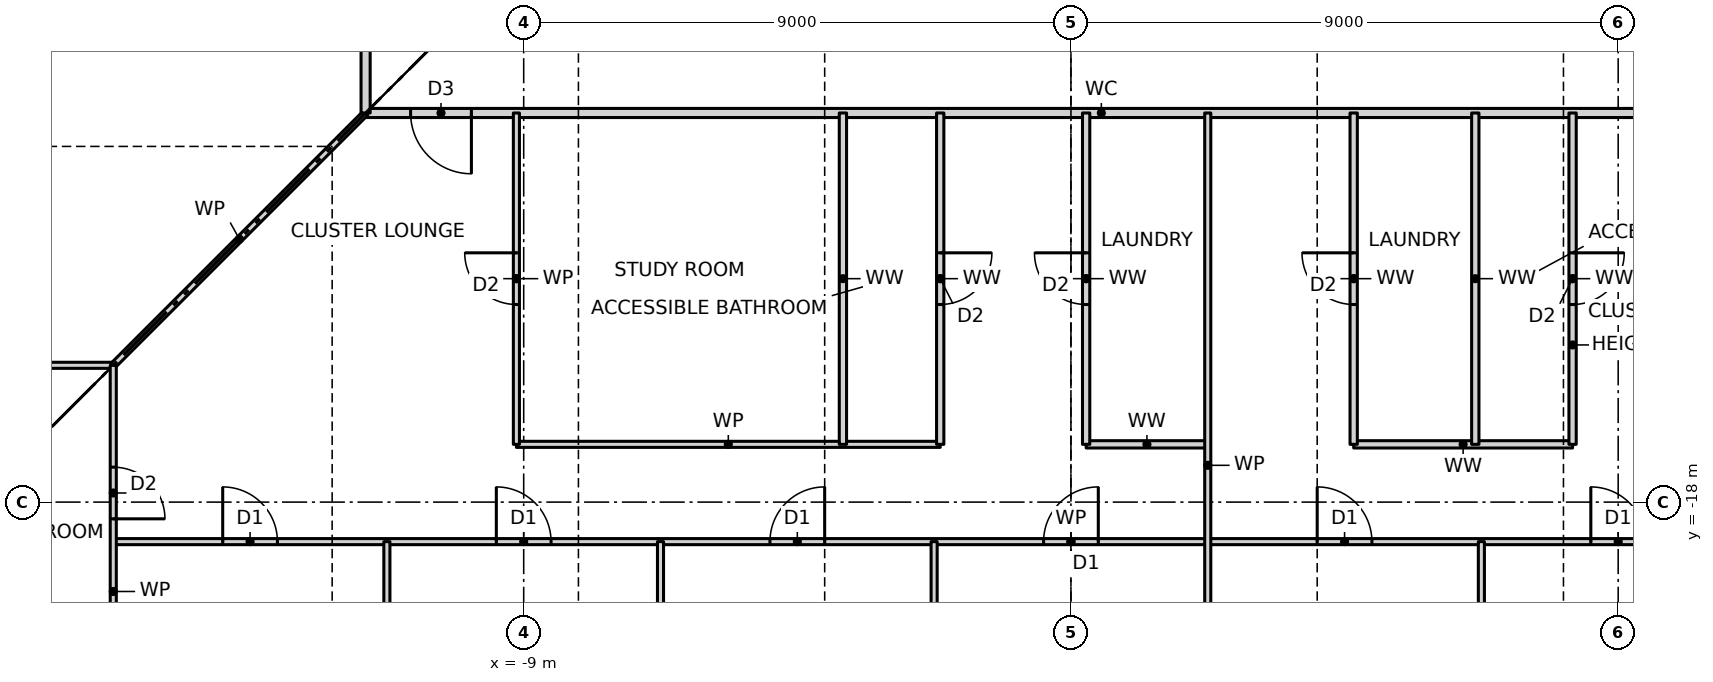
"""IFC4 building model, lengths in metres.
Left out: names, types, materials, properties, quantities, classifications, styles, units other than length and angle.
Written with IfcOpenShell. Run it as: python <this file> out.ifc"""

import sys

from ifc_helpers import new_model, si_unit, direction, frame, frame_2d, origin, place, context, subcontext, project, spatial, rectangle, extrude, element, fill, save


model = new_model("IFC4")
c1 = context("Model", 3, precision=1e-05, world=origin(), true_north=direction((0.0, 1.0)))
c2 = subcontext(c1, "Body", "Model", "MODEL_VIEW")
j1 = project(units=[si_unit("LENGTHUNIT", "METRE"), si_unit("PLANEANGLEUNIT", "RADIAN")], contexts=[c1])
p1 = place(None, origin())
s1 = spatial("IfcSite", under=j1, at=p1, CompositionType="ELEMENT")
p2 = place(p1, origin())
s2 = spatial("IfcBuilding", under=s1, at=p2, CompositionType="ELEMENT")
p3 = place(p2, frame((0.0, 0.0, 71.0)))
s3 = spatial("IfcBuildingStorey", under=s2, at=p3, CompositionType="ELEMENT", Elevation=71.0)
p4 = place(p3, frame((-15.75, -18.65, 0.0), z_axis=(0.0, 0.0, 1.0), x_axis=(1.0, 0.0, 0.0)))
e1 = element("IfcWall", 1, at=p4, inside=s3, PredefinedType="PARTITIONING", context=c2, shape_type="SweptSolid", body=[
    extrude(rectangle(XDim=31.5, YDim=0.1, at=frame_2d((15.75, 0.0))), origin(), (0.0, 0.0, 1.0), 3.2),
])
p5 = place(p4, frame((1.8, 0.0, 0.0)))
e2 = element("IfcOpeningElement", 2, at=p5, cuts=e1, PredefinedType="OPENING", context=c2, shape_type="SweptSolid", body=[
    extrude(rectangle(XDim=0.9, YDim=2.1, at=frame_2d((0.45, 1.05))), frame((0.0, 0.06, 0.0), z_axis=(0.0, -1.0, 0.0), x_axis=(1.0, 0.0, 0.0)), (0.0, 0.0, 1.0), 0.12),
])
p6 = place(p4, frame((6.3, 0.0, 0.0)))
e3 = element("IfcOpeningElement", 3, at=p6, cuts=e1, PredefinedType="OPENING", context=c2, shape_type="SweptSolid", body=[
    extrude(rectangle(XDim=0.9, YDim=2.1, at=frame_2d((0.45, 1.05))), frame((0.0, 0.06, 0.0), z_axis=(0.0, -1.0, 0.0), x_axis=(1.0, 0.0, 0.0)), (0.0, 0.0, 1.0), 0.12),
])
p7 = place(p4, frame((10.8, 0.0, 0.0)))
e4 = element("IfcOpeningElement", 4, at=p7, cuts=e1, PredefinedType="OPENING", context=c2, shape_type="SweptSolid", body=[
    extrude(rectangle(XDim=0.9, YDim=2.1, at=frame_2d((0.45, 1.05))), frame((0.0, 0.06, 0.0), z_axis=(0.0, -1.0, 0.0), x_axis=(1.0, 0.0, 0.0)), (0.0, 0.0, 1.0), 0.12),
])
p8 = place(p4, frame((15.3, 0.0, 0.0)))
e5 = element("IfcOpeningElement", 5, at=p8, cuts=e1, PredefinedType="OPENING", context=c2, shape_type="SweptSolid", body=[
    extrude(rectangle(XDim=0.9, YDim=2.1, at=frame_2d((0.45, 1.05))), frame((0.0, 0.06, 0.0), z_axis=(0.0, -1.0, 0.0), x_axis=(1.0, 0.0, 0.0)), (0.0, 0.0, 1.0), 0.12),
])
p9 = place(p4, frame((19.8, 0.0, 0.0)))
e6 = element("IfcOpeningElement", 6, at=p9, cuts=e1, PredefinedType="OPENING", context=c2, shape_type="SweptSolid", body=[
    extrude(rectangle(XDim=0.9, YDim=2.1, at=frame_2d((0.45, 1.05))), frame((0.0, 0.06, 0.0), z_axis=(0.0, -1.0, 0.0), x_axis=(1.0, 0.0, 0.0)), (0.0, 0.0, 1.0), 0.12),
])
p10 = place(p4, frame((24.3, 0.0, 0.0)))
e7 = element("IfcOpeningElement", 7, at=p10, cuts=e1, PredefinedType="OPENING", context=c2, shape_type="SweptSolid", body=[
    extrude(rectangle(XDim=0.9, YDim=2.1, at=frame_2d((0.45, 1.05))), frame((0.0, 0.06, 0.0), z_axis=(0.0, -1.0, 0.0), x_axis=(1.0, 0.0, 0.0)), (0.0, 0.0, 1.0), 0.12),
])
p11 = place(p4, frame((28.8, 0.0, 0.0)))
e8 = element("IfcOpeningElement", 8, at=p11, cuts=e1, PredefinedType="OPENING", context=c2, shape_type="SweptSolid", body=[
    extrude(rectangle(XDim=0.9, YDim=2.1, at=frame_2d((0.45, 1.05))), frame((0.0, 0.06, 0.0), z_axis=(0.0, -1.0, 0.0), x_axis=(1.0, 0.0, 0.0)), (0.0, 0.0, 1.0), 0.12),
])
p12 = place(p3, frame((-9.12, -17.05, 0.0), z_axis=(0.0, 0.0, 1.0), x_axis=(1.0, 0.0, 0.0)))
e9 = element("IfcWall", 9, at=p12, inside=s3, PredefinedType="PARTITIONING", context=c2, shape_type="SweptSolid", body=[
    extrude(rectangle(XDim=6.97, YDim=0.1, at=frame_2d((3.485, 0.0))), origin(), (0.0, 0.0, 1.0), 3.2),
])
p13 = place(p3, frame((0.25, -17.05, 0.0), z_axis=(0.0, 0.0, 1.0), x_axis=(1.0, 0.0, 0.0)))
e10 = element("IfcWall", 10, at=p13, inside=s3, PredefinedType="PARTITIONING", context=c2, shape_type="SweptSolid", body=[
    extrude(rectangle(XDim=2.0, YDim=0.12, at=frame_2d((1.0, 0.0))), origin(), (0.0, 0.0, 1.0), 3.2),
])
p14 = place(p3, frame((4.65, -17.05, 0.0), z_axis=(0.0, 0.0, 1.0), x_axis=(1.0, 0.0, 0.0)))
e11 = element("IfcWall", 11, at=p14, inside=s3, PredefinedType="PARTITIONING", context=c2, shape_type="SweptSolid", body=[
    extrude(rectangle(XDim=3.6, YDim=0.12, at=frame_2d((1.8, 0.0))), origin(), (0.0, 0.0, 1.0), 3.2),
])
p15 = place(p3, frame((-23.19, -15.75, 0.0), z_axis=(0.0, 0.0, 1.0), x_axis=(1.0, 0.0, 0.0)))
e12 = element("IfcWall", 12, at=p15, inside=s3, PredefinedType="PARTITIONING", context=c2, shape_type="SweptSolid", body=[
    extrude(rectangle(XDim=7.44, YDim=0.1, at=frame_2d((3.72, 0.0))), origin(), (0.0, 0.0, 1.0), 3.2),
])
p16 = place(p3, frame((-11.6, -11.6, 0.0), z_axis=(0.0, 0.0, 1.0), x_axis=(1.0, 0.0, 0.0)))
e13 = element("IfcWall", 13, at=p16, inside=s3, PredefinedType="PARTITIONING", context=c2, shape_type="SweptSolid", body=[
    extrude(rectangle(XDim=24.2, YDim=0.15, at=frame_2d((12.1, 0.0))), origin(), (0.0, 0.0, 1.0), 3.2),
])
p17 = place(p16, frame((0.74, 0.0, 0.0)))
e14 = element("IfcOpeningElement", 14, at=p17, cuts=e13, PredefinedType="OPENING", context=c2, shape_type="SweptSolid", body=[
    extrude(rectangle(XDim=1.0, YDim=2.1, at=frame_2d((0.5, 1.05))), frame((0.0, 0.085, 0.0), z_axis=(0.0, -1.0, 0.0), x_axis=(1.0, 0.0, 0.0)), (0.0, 0.0, 1.0), 0.17),
])
p18 = place(p16, frame((21.025, 0.0, 0.0)))
e15 = element("IfcOpeningElement", 15, at=p18, cuts=e13, PredefinedType="OPENING", context=c2, shape_type="SweptSolid", body=[
    extrude(rectangle(XDim=1.0, YDim=2.1, at=frame_2d((0.5, 1.05))), frame((0.0, 0.085, 0.0), z_axis=(0.0, -1.0, 0.0), x_axis=(1.0, 0.0, 0.0)), (0.0, 0.0, 1.0), 0.17),
])
p19 = place(p3, frame((-15.75, -15.75, 0.0), z_axis=(0.0, 0.0, 1.0), x_axis=(0.707106781187, 0.707106781187, 0.0)))
e16 = element("IfcWall", 16, at=p19, inside=s3, PredefinedType="PARTITIONING", context=c2, shape_type="SweptSolid", body=[
    extrude(rectangle(XDim=5.869, YDim=0.1, at=frame_2d((2.935, 0.0))), origin(), (0.0, 0.0, 1.0), 3.2),
])
p20 = place(p3, frame((8.25, -17.05, 0.0), z_axis=(0.0, 0.0, 1.0), x_axis=(0.0, 1.0, 0.0)))
e17 = element("IfcWall", 17, at=p20, inside=s3, PredefinedType="PARTITIONING", context=c2, shape_type="SweptSolid", body=[
    extrude(rectangle(XDim=5.45, YDim=0.12, at=frame_2d((2.725, 0.0))), origin(), (0.0, 0.0, 1.0), 2.273),
])
p21 = place(p20, frame((2.3, 0.0, 0.0)))
e18 = element("IfcOpeningElement", 18, at=p21, cuts=e17, PredefinedType="OPENING", context=c2, shape_type="SweptSolid", body=[
    extrude(rectangle(XDim=0.85, YDim=2.1, at=frame_2d((0.425, 1.05))), frame((0.0, 0.07, 0.0), z_axis=(0.0, -1.0, 0.0), x_axis=(1.0, 0.0, 0.0)), (0.0, 0.0, 1.0), 0.14),
])
p22 = place(p3, frame((6.75, -23.19, 0.0), z_axis=(0.0, 0.0, 1.0), x_axis=(0.0, 1.0, 0.0)))
e19 = element("IfcWall", 19, at=p22, inside=s3, PredefinedType="PARTITIONING", context=c2, shape_type="SweptSolid", body=[
    extrude(rectangle(XDim=4.54, YDim=0.1, at=frame_2d((2.27, 0.0))), origin(), (0.0, 0.0, 1.0), 3.2),
])
p23 = place(p3, frame((6.65, -17.05, 0.0), z_axis=(0.0, 0.0, 1.0), x_axis=(0.0, 1.0, 0.0)))
e20 = element("IfcWall", 20, at=p23, inside=s3, PredefinedType="PARTITIONING", context=c2, shape_type="SweptSolid", body=[
    extrude(rectangle(XDim=5.45, YDim=0.12, at=frame_2d((2.725, 0.0))), origin(), (0.0, 0.0, 1.0), 3.2),
])
p24 = place(p3, frame((4.65, -17.05, 0.0), z_axis=(0.0, 0.0, 1.0), x_axis=(0.0, 1.0, 0.0)))
e21 = element("IfcWall", 21, at=p24, inside=s3, PredefinedType="PARTITIONING", context=c2, shape_type="SweptSolid", body=[
    extrude(rectangle(XDim=5.45, YDim=0.12, at=frame_2d((2.725, 0.0))), origin(), (0.0, 0.0, 1.0), 3.2),
])
p25 = place(p24, frame((2.3, 0.0, 0.0)))
e22 = element("IfcOpeningElement", 22, at=p25, cuts=e21, PredefinedType="OPENING", context=c2, shape_type="SweptSolid", body=[
    extrude(rectangle(XDim=0.85, YDim=2.1, at=frame_2d((0.425, 1.05))), frame((0.0, 0.07, 0.0), z_axis=(0.0, -1.0, 0.0), x_axis=(1.0, 0.0, 0.0)), (0.0, 0.0, 1.0), 0.14),
])
p26 = place(p3, frame((2.25, -23.19, 0.0), z_axis=(0.0, 0.0, 1.0), x_axis=(0.0, 1.0, 0.0)))
e23 = element("IfcWall", 23, at=p26, inside=s3, PredefinedType="PARTITIONING", context=c2, shape_type="SweptSolid", body=[
    extrude(rectangle(XDim=11.59, YDim=0.1, at=frame_2d((5.795, 0.0))), origin(), (0.0, 0.0, 1.0), 3.2),
])
p27 = place(p3, frame((0.25, -17.05, 0.0), z_axis=(0.0, 0.0, 1.0), x_axis=(0.0, 1.0, 0.0)))
e24 = element("IfcWall", 24, at=p27, inside=s3, PredefinedType="PARTITIONING", context=c2, shape_type="SweptSolid", body=[
    extrude(rectangle(XDim=5.45, YDim=0.12, at=frame_2d((2.725, 0.0))), origin(), (0.0, 0.0, 1.0), 3.2),
])
p28 = place(p27, frame((2.3, 0.0, 0.0)))
e25 = element("IfcOpeningElement", 25, at=p28, cuts=e24, PredefinedType="OPENING", context=c2, shape_type="SweptSolid", body=[
    extrude(rectangle(XDim=0.85, YDim=2.1, at=frame_2d((0.425, 1.05))), frame((0.0, 0.07, 0.0), z_axis=(0.0, -1.0, 0.0), x_axis=(1.0, 0.0, 0.0)), (0.0, 0.0, 1.0), 0.14),
])
p29 = place(p3, frame((-2.15, -17.05, 0.0), z_axis=(0.0, 0.0, 1.0), x_axis=(0.0, 1.0, 0.0)))
e26 = element("IfcWall", 26, at=p29, inside=s3, PredefinedType="PARTITIONING", context=c2, shape_type="SweptSolid", body=[
    extrude(rectangle(XDim=5.45, YDim=0.12, at=frame_2d((2.725, 0.0))), origin(), (0.0, 0.0, 1.0), 3.2),
])
p30 = place(p29, frame((2.3, 0.0, 0.0)))
e27 = element("IfcOpeningElement", 27, at=p30, cuts=e26, PredefinedType="OPENING", context=c2, shape_type="SweptSolid", body=[
    extrude(rectangle(XDim=0.85, YDim=2.1, at=frame_2d((0.425, 1.05))), frame((0.0, 0.07, 0.0), z_axis=(0.0, -1.0, 0.0), x_axis=(1.0, 0.0, 0.0)), (0.0, 0.0, 1.0), 0.14),
])
p31 = place(p3, frame((-2.25, -23.19, 0.0), z_axis=(0.0, 0.0, 1.0), x_axis=(0.0, 1.0, 0.0)))
e28 = element("IfcWall", 28, at=p31, inside=s3, PredefinedType="PARTITIONING", context=c2, shape_type="SweptSolid", body=[
    extrude(rectangle(XDim=4.54, YDim=0.1, at=frame_2d((2.27, 0.0))), origin(), (0.0, 0.0, 1.0), 3.2),
])
p32 = place(p3, frame((-3.75, -17.05, 0.0), z_axis=(0.0, 0.0, 1.0), x_axis=(0.0, 1.0, 0.0)))
e29 = element("IfcWall", 29, at=p32, inside=s3, PredefinedType="PARTITIONING", context=c2, shape_type="SweptSolid", body=[
    extrude(rectangle(XDim=5.45, YDim=0.12, at=frame_2d((2.725, 0.0))), origin(), (0.0, 0.0, 1.0), 3.2),
])
p33 = place(p3, frame((-6.75, -23.19, 0.0), z_axis=(0.0, 0.0, 1.0), x_axis=(0.0, 1.0, 0.0)))
e30 = element("IfcWall", 30, at=p33, inside=s3, PredefinedType="PARTITIONING", context=c2, shape_type="SweptSolid", body=[
    extrude(rectangle(XDim=4.54, YDim=0.1, at=frame_2d((2.27, 0.0))), origin(), (0.0, 0.0, 1.0), 3.2),
])
p34 = place(p3, frame((-9.12, -17.05, 0.0), z_axis=(0.0, 0.0, 1.0), x_axis=(0.0, 1.0, 0.0)))
e31 = element("IfcWall", 31, at=p34, inside=s3, PredefinedType="PARTITIONING", context=c2, shape_type="SweptSolid", body=[
    extrude(rectangle(XDim=5.45, YDim=0.1, at=frame_2d((2.725, 0.0))), origin(), (0.0, 0.0, 1.0), 3.2),
])
p35 = place(p34, frame((2.3, 0.0, 0.0)))
e32 = element("IfcOpeningElement", 32, at=p35, cuts=e31, PredefinedType="OPENING", context=c2, shape_type="SweptSolid", body=[
    extrude(rectangle(XDim=0.85, YDim=2.1, at=frame_2d((0.425, 1.05))), frame((0.0, 0.06, 0.0), z_axis=(0.0, -1.0, 0.0), x_axis=(1.0, 0.0, 0.0)), (0.0, 0.0, 1.0), 0.12),
])
p36 = place(p3, frame((-11.25, -23.19, 0.0), z_axis=(0.0, 0.0, 1.0), x_axis=(0.0, 1.0, 0.0)))
e33 = element("IfcWall", 33, at=p36, inside=s3, PredefinedType="PARTITIONING", context=c2, shape_type="SweptSolid", body=[
    extrude(rectangle(XDim=4.54, YDim=0.1, at=frame_2d((2.27, 0.0))), origin(), (0.0, 0.0, 1.0), 3.2),
])
p37 = place(p3, frame((-11.6, -11.6, 0.0), z_axis=(0.0, 0.0, 1.0), x_axis=(0.0, 1.0, 0.0)))
e34 = element("IfcWall", 34, at=p37, inside=s3, PredefinedType="PARTITIONING", context=c2, shape_type="SweptSolid", body=[
    extrude(rectangle(XDim=23.2, YDim=0.15, at=frame_2d((11.6, 0.0))), origin(), (0.0, 0.0, 1.0), 3.2),
])
p38 = place(p37, frame((18.6, 0.0, 0.0)))
e35 = element("IfcOpeningElement", 35, at=p38, cuts=e34, PredefinedType="OPENING", context=c2, shape_type="SweptSolid", body=[
    extrude(rectangle(XDim=1.0, YDim=2.1, at=frame_2d((0.5, 1.05))), frame((0.0, 0.085, 0.0), z_axis=(0.0, -1.0, 0.0), x_axis=(1.0, 0.0, 0.0)), (0.0, 0.0, 1.0), 0.17),
])
p39 = place(p37, frame((1.175, 0.0, 0.0)))
e36 = element("IfcOpeningElement", 36, at=p39, cuts=e34, PredefinedType="OPENING", context=c2, shape_type="SweptSolid", body=[
    extrude(rectangle(XDim=1.0, YDim=2.1, at=frame_2d((0.5, 1.05))), frame((0.0, 0.085, 0.0), z_axis=(0.0, -1.0, 0.0), x_axis=(1.0, 0.0, 0.0)), (0.0, 0.0, 1.0), 0.17),
])
p40 = place(p3, frame((-15.75, -23.19, 0.0), z_axis=(0.0, 0.0, 1.0), x_axis=(0.0, 1.0, 0.0)))
e37 = element("IfcWall", 37, at=p40, inside=s3, PredefinedType="PARTITIONING", context=c2, shape_type="SweptSolid", body=[
    extrude(rectangle(XDim=7.44, YDim=0.1, at=frame_2d((3.72, 0.0))), origin(), (0.0, 0.0, 1.0), 3.2),
])
p41 = place(p40, frame((4.915, 0.0, 0.0)))
e38 = element("IfcOpeningElement", 38, at=p41, cuts=e37, PredefinedType="OPENING", context=c2, shape_type="SweptSolid", body=[
    extrude(rectangle(XDim=0.85, YDim=2.1, at=frame_2d((0.425, 1.05))), frame((0.0, 0.06, 0.0), z_axis=(0.0, -1.0, 0.0), x_axis=(1.0, 0.0, 0.0)), (0.0, 0.0, 1.0), 0.12),
])
p42 = place(p5, origin())
e39 = element("IfcDoor", 39, at=p42, inside=s3, OperationType="SINGLE_SWING_LEFT", PredefinedType="DOOR", context=c2, shape_type="SweptSolid", body=[
    extrude(rectangle(XDim=0.9, YDim=2.1, at=frame_2d((0.45, 1.05))), frame((0.0, 0.025, 0.0), z_axis=(0.0, -1.0, 0.0), x_axis=(1.0, 0.0, 0.0)), (0.0, 0.0, 1.0), 0.05),
])
fill(e2, e39)
p43 = place(p6, origin())
e40 = element("IfcDoor", 40, at=p43, inside=s3, OperationType="SINGLE_SWING_LEFT", PredefinedType="DOOR", context=c2, shape_type="SweptSolid", body=[
    extrude(rectangle(XDim=0.9, YDim=2.1, at=frame_2d((0.45, 1.05))), frame((0.0, 0.025, 0.0), z_axis=(0.0, -1.0, 0.0), x_axis=(1.0, 0.0, 0.0)), (0.0, 0.0, 1.0), 0.05),
])
fill(e3, e40)
p44 = place(p7, origin())
e41 = element("IfcDoor", 41, at=p44, inside=s3, OperationType="SINGLE_SWING_RIGHT", PredefinedType="DOOR", context=c2, shape_type="SweptSolid", body=[
    extrude(rectangle(XDim=0.9, YDim=2.1, at=frame_2d((0.45, 1.05))), frame((0.0, 0.025, 0.0), z_axis=(0.0, -1.0, 0.0), x_axis=(1.0, 0.0, 0.0)), (0.0, 0.0, 1.0), 0.05),
])
fill(e4, e41)
p45 = place(p8, origin())
e42 = element("IfcDoor", 42, at=p45, inside=s3, OperationType="SINGLE_SWING_RIGHT", PredefinedType="DOOR", context=c2, shape_type="SweptSolid", body=[
    extrude(rectangle(XDim=0.9, YDim=2.1, at=frame_2d((0.45, 1.05))), frame((0.0, 0.025, 0.0), z_axis=(0.0, -1.0, 0.0), x_axis=(1.0, 0.0, 0.0)), (0.0, 0.0, 1.0), 0.05),
])
fill(e5, e42)
p46 = place(p17, frame((1.0, 0.0, 0.0), z_axis=(0.0, 0.0, 1.0), x_axis=(-1.0, 0.0, 0.0)))
e43 = element("IfcDoor", 43, at=p46, inside=s3, OperationType="SINGLE_SWING_LEFT", PredefinedType="DOOR", context=c2, shape_type="SweptSolid", body=[
    extrude(rectangle(XDim=1.0, YDim=2.1, at=frame_2d((0.5, 1.05))), frame((0.0, 0.025, 0.0), z_axis=(0.0, -1.0, 0.0), x_axis=(1.0, 0.0, 0.0)), (0.0, 0.0, 1.0), 0.05),
])
fill(e14, e43)
p47 = place(p35, origin())
e44 = element("IfcDoor", 44, at=p47, inside=s3, OperationType="SINGLE_SWING_RIGHT", PredefinedType="DOOR", context=c2, shape_type="SweptSolid", body=[
    extrude(rectangle(XDim=0.85, YDim=2.1, at=frame_2d((0.425, 1.05))), frame((0.0, 0.025, 0.0), z_axis=(0.0, -1.0, 0.0), x_axis=(1.0, 0.0, 0.0)), (0.0, 0.0, 1.0), 0.05),
])
fill(e32, e44)
p48 = place(p30, frame((0.85, 0.0, 0.0), z_axis=(0.0, 0.0, 1.0), x_axis=(-1.0, 0.0, 0.0)))
e45 = element("IfcDoor", 45, at=p48, inside=s3, OperationType="SINGLE_SWING_LEFT", PredefinedType="DOOR", context=c2, shape_type="SweptSolid", body=[
    extrude(rectangle(XDim=0.85, YDim=2.1, at=frame_2d((0.425, 1.05))), frame((0.0, 0.025, 0.0), z_axis=(0.0, -1.0, 0.0), x_axis=(1.0, 0.0, 0.0)), (0.0, 0.0, 1.0), 0.05),
])
fill(e27, e45)
p49 = place(p28, origin())
e46 = element("IfcDoor", 46, at=p49, inside=s3, OperationType="SINGLE_SWING_RIGHT", PredefinedType="DOOR", context=c2, shape_type="SweptSolid", body=[
    extrude(rectangle(XDim=0.85, YDim=2.1, at=frame_2d((0.425, 1.05))), frame((0.0, 0.025, 0.0), z_axis=(0.0, -1.0, 0.0), x_axis=(1.0, 0.0, 0.0)), (0.0, 0.0, 1.0), 0.05),
])
fill(e25, e46)
p50 = place(p9, origin())
e47 = element("IfcDoor", 47, at=p50, inside=s3, OperationType="SINGLE_SWING_LEFT", PredefinedType="DOOR", context=c2, shape_type="SweptSolid", body=[
    extrude(rectangle(XDim=0.9, YDim=2.1, at=frame_2d((0.45, 1.05))), frame((0.0, 0.025, 0.0), z_axis=(0.0, -1.0, 0.0), x_axis=(1.0, 0.0, 0.0)), (0.0, 0.0, 1.0), 0.05),
])
fill(e6, e47)
p51 = place(p10, origin())
e48 = element("IfcDoor", 48, at=p51, inside=s3, OperationType="SINGLE_SWING_LEFT", PredefinedType="DOOR", context=c2, shape_type="SweptSolid", body=[
    extrude(rectangle(XDim=0.9, YDim=2.1, at=frame_2d((0.45, 1.05))), frame((0.0, 0.025, 0.0), z_axis=(0.0, -1.0, 0.0), x_axis=(1.0, 0.0, 0.0)), (0.0, 0.0, 1.0), 0.05),
])
fill(e7, e48)
p52 = place(p25, origin())
e49 = element("IfcDoor", 49, at=p52, inside=s3, OperationType="SINGLE_SWING_RIGHT", PredefinedType="DOOR", context=c2, shape_type="SweptSolid", body=[
    extrude(rectangle(XDim=0.85, YDim=2.1, at=frame_2d((0.425, 1.05))), frame((0.0, 0.025, 0.0), z_axis=(0.0, -1.0, 0.0), x_axis=(1.0, 0.0, 0.0)), (0.0, 0.0, 1.0), 0.05),
])
fill(e22, e49)
p53 = place(p21, frame((0.85, 0.0, 0.0), z_axis=(0.0, 0.0, 1.0), x_axis=(-1.0, 0.0, 0.0)))
e50 = element("IfcDoor", 50, at=p53, inside=s3, OperationType="SINGLE_SWING_LEFT", PredefinedType="DOOR", context=c2, shape_type="SweptSolid", body=[
    extrude(rectangle(XDim=0.85, YDim=2.1, at=frame_2d((0.425, 1.05))), frame((0.0, 0.025, 0.0), z_axis=(0.0, -1.0, 0.0), x_axis=(1.0, 0.0, 0.0)), (0.0, 0.0, 1.0), 0.05),
])
fill(e18, e50)
p54 = place(p41, frame((0.85, 0.0, 0.0), z_axis=(0.0, 0.0, 1.0), x_axis=(-1.0, 0.0, 0.0)))
e51 = element("IfcDoor", 51, at=p54, inside=s3, OperationType="SINGLE_SWING_RIGHT", PredefinedType="DOOR", context=c2, shape_type="SweptSolid", body=[
    extrude(rectangle(XDim=0.85, YDim=2.1, at=frame_2d((0.425, 1.05))), frame((0.0, 0.025, 0.0), z_axis=(0.0, -1.0, 0.0), x_axis=(1.0, 0.0, 0.0)), (0.0, 0.0, 1.0), 0.05),
])
fill(e38, e51)
save(model, sys.argv[1])
